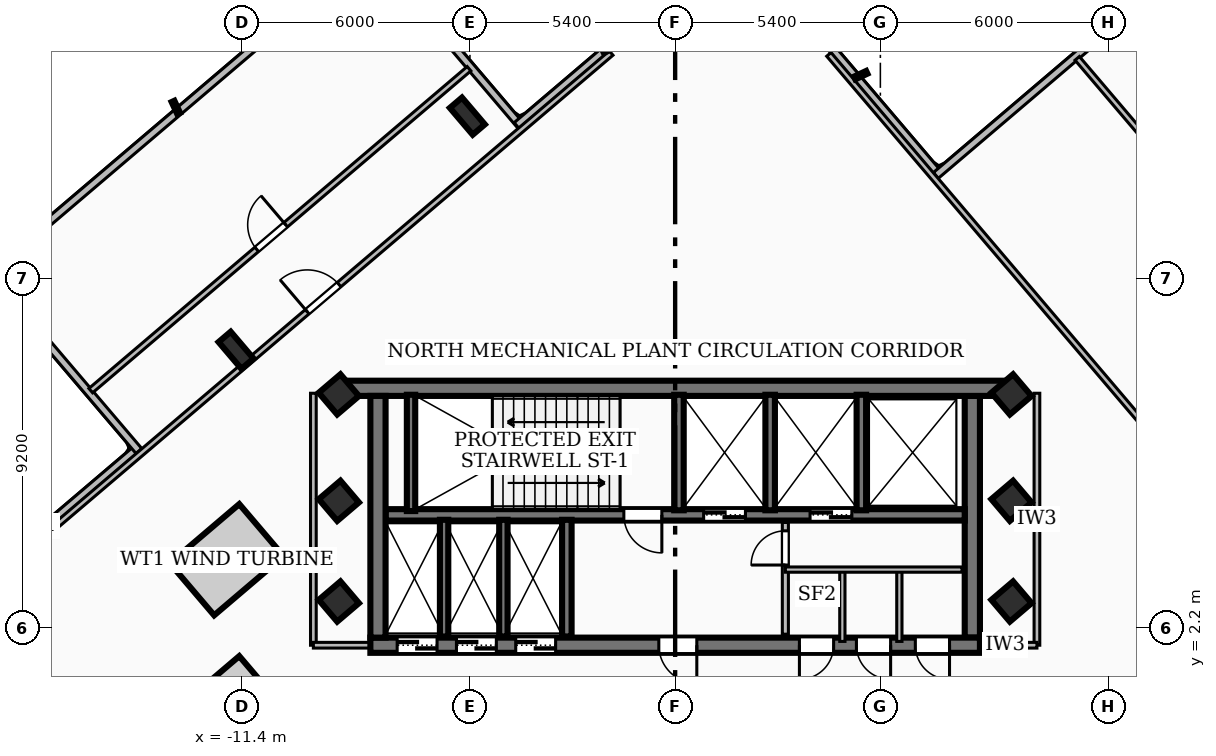
"""IFC4 building model, lengths in metres.
Left out: names, types, materials, properties, quantities, classifications, styles, units other than length and angle.
Written with IfcOpenShell. Run it as: python <this file> out.ifc"""

import sys

from ifc_helpers import new_model, si_unit, direction, frame, frame_2d, origin, origin_2d, place, context, subcontext, project, spatial, rectangle, hollow_rectangle, i_section, extrude, element, fill, save


model = new_model("IFC4")
c1 = context("Model", 3, precision=1e-05, world=origin(), true_north=direction((0.0, 1.0)))
c2 = subcontext(c1, "Body", "Model", "MODEL_VIEW")
j1 = project(units=[si_unit("LENGTHUNIT", "METRE"), si_unit("PLANEANGLEUNIT", "RADIAN")], contexts=[c1])
p1 = place(None, origin())
s1 = spatial("IfcSite", under=j1, at=p1, CompositionType="ELEMENT")
p2 = place(p1, origin())
s2 = spatial("IfcBuilding", under=s1, at=p2, CompositionType="ELEMENT")
p3 = place(p2, frame((0.0, 0.0, 239.4)))
s3 = spatial("IfcBuildingStorey", under=s2, at=p3, CompositionType="ELEMENT", Elevation=239.4)
p4 = place(p3, frame((-8.78, 8.51, 0.0), z_axis=(0.0, 0.0, 1.0), x_axis=(1.0, 0.0, 0.0)))
e1 = element("IfcWall", 1, at=p4, inside=s3, PredefinedType="SHEAR", context=c2, shape_type="SweptSolid", body=[
    extrude(rectangle(XDim=17.56, YDim=0.4, at=frame_2d((8.78, 0.0))), origin(), (0.0, 0.0, 1.0), 4.42),
])
p5 = place(p3, frame((8.02, 1.75, 0.0), z_axis=(0.0, 0.0, 1.0), x_axis=(-1.0, 0.0, 0.0)))
e2 = element("IfcWall", 2, at=p5, inside=s3, PredefinedType="SHEAR", context=c2, shape_type="SweptSolid", body=[
    extrude(rectangle(XDim=16.04, YDim=0.4, at=frame_2d((8.02, 0.0))), origin(), (0.0, 0.0, 1.0), 4.42),
])
p6 = place(p5, frame((7.45, 0.0, 0.0)))
e3 = element("IfcOpeningElement", 3, at=p6, cuts=e2, PredefinedType="OPENING", context=c2, shape_type="SweptSolid", body=[
    extrude(rectangle(XDim=1.0, YDim=2.1, at=frame_2d((0.5, 1.05))), frame((0.0, 0.21, 0.0), z_axis=(0.0, -1.0, 0.0), x_axis=(1.0, 0.0, 0.0)), (0.0, 0.0, 1.0), 0.42),
])
p7 = place(p5, frame((14.285, 0.0, 0.0)))
e4 = element("IfcOpeningElement", 4, at=p7, cuts=e2, PredefinedType="OPENING", context=c2, shape_type="SweptSolid", body=[
    extrude(rectangle(XDim=1.05, YDim=2.15, at=frame_2d((0.525, 1.075))), frame((0.0, 0.21, 0.0), z_axis=(0.0, -1.0, 0.0), x_axis=(1.0, 0.0, 0.0)), (0.0, 0.0, 1.0), 0.42),
])
p8 = place(p5, frame((12.725, 0.0, 0.0)))
e5 = element("IfcOpeningElement", 5, at=p8, cuts=e2, PredefinedType="OPENING", context=c2, shape_type="SweptSolid", body=[
    extrude(rectangle(XDim=1.05, YDim=2.15, at=frame_2d((0.525, 1.075))), frame((0.0, 0.21, 0.0), z_axis=(0.0, -1.0, 0.0), x_axis=(1.0, 0.0, 0.0)), (0.0, 0.0, 1.0), 0.42),
])
p9 = place(p5, frame((11.165, 0.0, 0.0)))
e6 = element("IfcOpeningElement", 6, at=p9, cuts=e2, PredefinedType="OPENING", context=c2, shape_type="SweptSolid", body=[
    extrude(rectangle(XDim=1.05, YDim=2.15, at=frame_2d((0.525, 1.075))), frame((0.0, 0.21, 0.0), z_axis=(0.0, -1.0, 0.0), x_axis=(1.0, 0.0, 0.0)), (0.0, 0.0, 1.0), 0.42),
])
p10 = place(p5, frame((3.85, 0.0, 0.0)))
e7 = element("IfcOpeningElement", 7, at=p10, cuts=e2, PredefinedType="OPENING", context=c2, shape_type="SweptSolid", body=[
    extrude(rectangle(XDim=0.9, YDim=2.06, at=frame_2d((0.45, 1.03))), frame((0.0, 0.21, 0.0), z_axis=(0.0, -1.0, 0.0), x_axis=(1.0, 0.0, 0.0)), (0.0, 0.0, 1.0), 0.42),
])
p11 = place(p5, frame((2.35, 0.0, 0.0)))
e8 = element("IfcOpeningElement", 8, at=p11, cuts=e2, PredefinedType="OPENING", context=c2, shape_type="SweptSolid", body=[
    extrude(rectangle(XDim=0.9, YDim=2.06, at=frame_2d((0.45, 1.03))), frame((0.0, 0.21, 0.0), z_axis=(0.0, -1.0, 0.0), x_axis=(1.0, 0.0, 0.0)), (0.0, 0.0, 1.0), 0.42),
])
p12 = place(p5, frame((0.8, 0.0, 0.0)))
e9 = element("IfcOpeningElement", 9, at=p12, cuts=e2, PredefinedType="OPENING", context=c2, shape_type="SweptSolid", body=[
    extrude(rectangle(XDim=0.9, YDim=2.06, at=frame_2d((0.45, 1.03))), frame((0.0, 0.21, 0.0), z_axis=(0.0, -1.0, 0.0), x_axis=(1.0, 0.0, 0.0)), (0.0, 0.0, 1.0), 0.42),
])
for number, where, z_axis, x_axis in (
    (10, (-7.82, 1.95, 0.0), (0.0, 0.0, 1.0), (0.0, 1.0, 0.0)),
    (11, (7.82, 8.31, 0.0), (0.0, 0.0, 1.0), (0.0, -1.0, 0.0)),
):
    element("IfcWall", number, at=place(p3, frame(where, z_axis=z_axis, x_axis=x_axis)), inside=s3, PredefinedType="SHEAR", context=c2, shape_type="SweptSolid", body=[
        extrude(rectangle(XDim=6.36, YDim=0.4, at=frame_2d((3.18, 0.0))), origin(), (0.0, 0.0, 1.0), 4.42),
    ])
p13 = place(p3, frame((7.62, 5.18, 0.0), z_axis=(0.0, 0.0, 1.0), x_axis=(-1.0, 0.0, 0.0)))
e12 = element("IfcWall", 12, at=p13, inside=s3, PredefinedType="SOLIDWALL", context=c2, shape_type="SweptSolid", body=[
    extrude(rectangle(XDim=15.24, YDim=0.3, at=frame_2d((7.62, 0.0))), origin(), (0.0, 0.0, 1.0), 4.42),
])
p14 = place(p13, frame((5.77, 0.0, 0.0)))
e13 = element("IfcOpeningElement", 13, at=p14, cuts=e12, PredefinedType="OPENING", context=c2, shape_type="SweptSolid", body=[
    extrude(rectangle(XDim=1.1, YDim=2.15, at=frame_2d((0.55, 1.075))), frame((0.0, 0.16, 0.0), z_axis=(0.0, -1.0, 0.0), x_axis=(1.0, 0.0, 0.0)), (0.0, 0.0, 1.0), 0.32),
])
p15 = place(p13, frame((2.97, 0.0, 0.0)))
e14 = element("IfcOpeningElement", 14, at=p15, cuts=e12, PredefinedType="OPENING", context=c2, shape_type="SweptSolid", body=[
    extrude(rectangle(XDim=1.1, YDim=2.15, at=frame_2d((0.55, 1.075))), frame((0.0, 0.16, 0.0), z_axis=(0.0, -1.0, 0.0), x_axis=(1.0, 0.0, 0.0)), (0.0, 0.0, 1.0), 0.32),
])
p16 = place(p13, frame((7.97, 0.0, 0.0)))
e15 = element("IfcOpeningElement", 15, at=p16, cuts=e12, PredefinedType="OPENING", context=c2, shape_type="SweptSolid", body=[
    extrude(rectangle(XDim=1.0, YDim=2.1, at=frame_2d((0.5, 1.05))), frame((0.0, 0.16, 0.0), z_axis=(0.0, -1.0, 0.0), x_axis=(1.0, 0.0, 0.0)), (0.0, 0.0, 1.0), 0.32),
])
p17 = place(p3, frame((-6.95, 5.28, 0.0), z_axis=(0.0, 0.0, 1.0), x_axis=(0.0, 1.0, 0.0)))
e16 = element("IfcWall", 16, at=p17, inside=s3, PredefinedType="SOLIDWALL", context=c2, shape_type="SweptSolid", body=[
    extrude(rectangle(XDim=3.06, YDim=0.22, at=frame_2d((1.53, 0.0))), origin(), (0.0, 0.0, 1.0), 4.42),
])
for number, where, z_axis, x_axis in (
    (17, (0.1, 5.3, 0.0), (0.0, 0.0, 1.0), (0.0, 1.0, 0.0)),
    (18, (2.5, 5.3, 0.0), (0.0, 0.0, 1.0), (0.0, 1.0, 0.0)),
    (19, (4.9, 5.3, 0.0), (0.0, 0.0, 1.0), (0.0, 1.0, 0.0)),
):
    element("IfcWall", number, at=place(p3, frame(where, z_axis=z_axis, x_axis=x_axis)), inside=s3, PredefinedType="SOLIDWALL", context=c2, shape_type="SweptSolid", body=[
        extrude(rectangle(XDim=3.04, YDim=0.25, at=frame_2d((1.52, 0.0))), origin(), (0.0, 0.0, 1.0), 4.42),
    ])
p18 = place(p3, frame((-2.85, 1.98, 0.0), z_axis=(0.0, 0.0, 1.0), x_axis=(0.0, 1.0, 0.0)))
e20 = element("IfcWall", 20, at=p18, inside=s3, PredefinedType="SOLIDWALL", context=c2, shape_type="SweptSolid", body=[
    extrude(rectangle(XDim=3.07, YDim=0.25, at=frame_2d((1.535, 0.0))), origin(), (0.0, 0.0, 1.0), 4.42),
])
for number, where, z_axis, x_axis in (
    (21, (-6.08, 1.98, 0.0), (0.0, 0.0, 1.0), (0.0, 1.0, 0.0)),
    (22, (-4.52, 1.98, 0.0), (0.0, 0.0, 1.0), (0.0, 1.0, 0.0)),
):
    element("IfcWall", number, at=place(p3, frame(where, z_axis=z_axis, x_axis=x_axis)), inside=s3, PredefinedType="SOLIDWALL", context=c2, shape_type="SweptSolid", body=[
        extrude(rectangle(XDim=3.07, YDim=0.22, at=frame_2d((1.535, 0.0))), origin(), (0.0, 0.0, 1.0), 4.42),
    ])
for number, where, z_axis, x_axis in (
    (23, (-8.85, 2.9, 0.0), (0.0, 0.0, 1.0), (0.762, 0.648, 0.0)),
    (24, (-8.85, 5.55, 0.0), (0.0, 0.0, 1.0), (0.762, 0.648, 0.0)),
    (25, (8.85, 2.9, 0.0), (0.0, 0.0, 1.0), (0.762, 0.648, 0.0)),
    (26, (8.85, 5.55, 0.0), (0.0, 0.0, 1.0), (0.762, 0.648, 0.0)),
    (27, (-8.85, 8.35, 0.0), (0.0, 0.0, 1.0), (0.762, 0.648, 0.0)),
    (28, (8.85, 8.35, 0.0), (0.0, 0.0, 1.0), (0.762, 0.648, 0.0)),
):
    element("IfcColumn", number, at=place(p3, frame(where, z_axis=z_axis, x_axis=x_axis)), inside=s3, PredefinedType="COLUMN", context=c2, shape_type="SweptSolid", body=[
        extrude(rectangle(XDim=0.75, YDim=0.75, at=origin_2d()), origin(), (0.0, 0.0, 1.0), 4.68),
    ])
for number, where, z_axis, x_axis in (
    (29, (-5.468, 15.671, 0.0), (0.0, 0.0, 1.0), (0.762, 0.648, 0.0)),
    (30, (-11.554, 9.51, 0.0), (0.0, 0.0, 1.0), (0.762, 0.648, 0.0)),
):
    element("IfcColumn", number, at=place(p3, frame(where, z_axis=z_axis, x_axis=x_axis)), inside=s3, PredefinedType="COLUMN", context=c2, shape_type="SweptSolid", body=[
        extrude(i_section(OverallWidth=0.418, OverallDepth=0.927, WebThickness=0.019, FlangeThickness=0.032, at=origin_2d()), origin(), (0.0, 0.0, 1.0), 4.68),
    ])
p19 = place(p3, frame((-11.8, 4.0, 0.0), z_axis=(0.0, 0.0, 1.0), x_axis=(0.761538307537, 0.648119901063, 0.0)))
e31 = element("IfcColumn", 31, at=p19, inside=s3, PredefinedType="COLUMN", context=c2, shape_type="SweptSolid", body=[
    extrude(hollow_rectangle(XDim=0.3, YDim=0.3, WallThickness=0.016, at=origin_2d()), origin(), (0.0, 0.0, 1.0), 1.6),
])
p20 = place(p3, frame((-19.236, 2.604, 0.0), z_axis=(0.0, 0.0, 1.0), x_axis=(0.761575518431, 0.648076175867, 0.0)))
e32 = element("IfcWall", 32, at=p20, inside=s3, PredefinedType="SOLIDWALL", context=c2, shape_type="SweptSolid", body=[
    extrude(rectangle(XDim=6.741, YDim=0.2, at=frame_2d((3.371, 0.0))), origin(), (0.0, 0.0, 1.0), 4.42),
])
p21 = place(p3, frame((-14.111, 6.86, 0.0), z_axis=(0.0, 0.0, 1.0), x_axis=(-0.648040740079, 0.761605671721, 0.0)))
e33 = element("IfcWall", 33, at=p21, inside=s3, PredefinedType="SOLIDWALL", context=c2, shape_type="SweptSolid", body=[
    extrude(rectangle(XDim=4.641, YDim=0.2, at=frame_2d((2.321, 0.0))), origin(), (0.0, 0.0, 1.0), 4.42),
])
p22 = place(p3, frame((-16.951, 12.493, 0.0), z_axis=(0.0, 0.0, 1.0), x_axis=(0.761554435907, 0.648100949814, 0.0)))
e34 = element("IfcWall", 34, at=p22, inside=s3, PredefinedType="SOLIDWALL", context=c2, shape_type="SweptSolid", body=[
    extrude(rectangle(XDim=10.224, YDim=0.2, at=frame_2d((5.112, 0.0))), origin(), (0.0, 0.0, 1.0), 4.42),
])
p23 = place(p3, frame((-7.067, 18.95, 0.0), z_axis=(0.0, 0.0, 1.0), x_axis=(0.648040740079, -0.761605671721, 0.0)))
e35 = element("IfcWall", 35, at=p23, inside=s3, PredefinedType="SOLIDWALL", context=c2, shape_type="SweptSolid", body=[
    extrude(rectangle(XDim=4.641, YDim=0.2, at=frame_2d((2.321, 0.0))), origin(), (0.0, 0.0, 1.0), 2.212),
])
p24 = place(p3, frame((-4.172, 15.424, 0.0), z_axis=(0.0, 0.0, 1.0), x_axis=(0.761580290689, 0.648070567789, 0.0)))
e36 = element("IfcWall", 36, at=p24, inside=s3, PredefinedType="SOLIDWALL", context=c2, shape_type="SweptSolid", body=[
    extrude(rectangle(XDim=6.143, YDim=0.2, at=frame_2d((3.071, 0.0))), origin(), (0.0, 0.0, 1.0), 2.212),
])
p25 = place(p3, frame((2.604, 19.236, 0.0), z_axis=(0.0, 0.0, 1.0), x_axis=(0.648076175867, -0.761575518431, 0.0)))
e37 = element("IfcWall", 37, at=p25, inside=s3, PredefinedType="SOLIDWALL", context=c2, shape_type="SweptSolid", body=[
    extrude(rectangle(XDim=6.741, YDim=0.2, at=frame_2d((3.371, 0.0))), origin(), (0.0, 0.0, 1.0), 2.212),
])
p26 = place(p3, frame((6.86, 14.111, 0.0), z_axis=(0.0, 0.0, 1.0), x_axis=(0.761539969586, 0.648117948157, 0.0)))
e38 = element("IfcWall", 38, at=p26, inside=s3, PredefinedType="SOLIDWALL", context=c2, shape_type="SweptSolid", body=[
    extrude(rectangle(XDim=8.843, YDim=0.2, at=frame_2d((4.421, 0.0))), origin(), (0.0, 0.0, 1.0), 2.212),
])
p27 = place(p3, frame((2.9, 2.04, 0.0), z_axis=(0.0, 0.0, 1.0), x_axis=(0.0, 1.0, 0.0)))
e39 = element("IfcWall", 39, at=p27, inside=s3, PredefinedType="PARTITIONING", context=c2, shape_type="SweptSolid", body=[
    extrude(rectangle(XDim=2.94, YDim=0.16, at=frame_2d((1.47, 0.0))), origin(), (0.0, 0.0, 1.0), 3.65),
])
p28 = place(p27, frame((1.82, 0.0, 0.0)))
e40 = element("IfcOpeningElement", 40, at=p28, cuts=e39, PredefinedType="OPENING", context=c2, shape_type="SweptSolid", body=[
    extrude(rectangle(XDim=0.9, YDim=2.06, at=frame_2d((0.45, 1.03))), frame((0.0, 0.09, 0.0), z_axis=(0.0, -1.0, 0.0), x_axis=(1.0, 0.0, 0.0)), (0.0, 0.0, 1.0), 0.18),
])
p29 = place(p3, frame((2.9, 3.74, 0.0), z_axis=(0.0, 0.0, 1.0), x_axis=(1.0, 0.0, 0.0)))
e41 = element("IfcWall", 41, at=p29, inside=s3, PredefinedType="PARTITIONING", context=c2, shape_type="SweptSolid", body=[
    extrude(rectangle(XDim=4.65, YDim=0.138, at=frame_2d((2.325, 0.0))), origin(), (0.0, 0.0, 1.0), 4.42),
])
for number, where, z_axis, x_axis in (
    (42, (4.4, 1.85, 0.0), (0.0, 0.0, 1.0), (0.0, 1.0, 0.0)),
    (43, (5.9, 1.85, 0.0), (0.0, 0.0, 1.0), (0.0, 1.0, 0.0)),
):
    element("IfcWall", number, at=place(p3, frame(where, z_axis=z_axis, x_axis=x_axis)), inside=s3, PredefinedType="PARTITIONING", context=c2, shape_type="SweptSolid", body=[
        extrude(rectangle(XDim=1.89, YDim=0.138, at=frame_2d((0.945, 0.0))), origin(), (0.0, 0.0, 1.0), 3.65),
    ])
p30 = place(p3, frame((-9.52, 1.75, 0.0), z_axis=(0.0, 0.0, 1.0), x_axis=(0.0, 1.0, 0.0)))
e44 = element("IfcWall", 44, at=p30, inside=s3, PredefinedType="PARTITIONING", context=c2, shape_type="SweptSolid", body=[
    extrude(rectangle(XDim=6.63, YDim=0.15, at=frame_2d((3.315, 0.0))), origin(), (0.0, 0.0, 1.0), 2.212),
])
p31 = place(p3, frame((-7.85, 1.75, 0.0), z_axis=(0.0, 0.0, 1.0), x_axis=(-1.0, 0.0, 0.0)))
e45 = element("IfcWall", 45, at=p31, inside=s3, PredefinedType="PARTITIONING", context=c2, shape_type="SweptSolid", body=[
    extrude(rectangle(XDim=1.67, YDim=0.15, at=frame_2d((0.835, 0.0))), origin(), (0.0, 0.0, 1.0), 3.65),
])
p32 = place(p3, frame((9.52, 1.75, 0.0), z_axis=(0.0, 0.0, 1.0), x_axis=(0.0, 1.0, 0.0)))
e46 = element("IfcWall", 46, at=p32, inside=s3, PredefinedType="PARTITIONING", context=c2, shape_type="SweptSolid", body=[
    extrude(rectangle(XDim=6.63, YDim=0.15, at=frame_2d((3.315, 0.0))), origin(), (0.0, 0.0, 1.0), 2.212),
])
p33 = place(p3, frame((7.85, 1.75, 0.0), z_axis=(0.0, 0.0, 1.0), x_axis=(1.0, 0.0, 0.0)))
e47 = element("IfcWall", 47, at=p33, inside=s3, PredefinedType="PARTITIONING", context=c2, shape_type="SweptSolid", body=[
    extrude(rectangle(XDim=1.67, YDim=0.15, at=frame_2d((0.835, 0.0))), origin(), (0.0, 0.0, 1.0), 3.65),
])
p34 = place(p3, frame((4.045, 17.296, 0.0), z_axis=(0.0, 0.0, 1.0), x_axis=(0.648103934292, -0.761551896035, 0.0)))
e48 = element("IfcWall", 48, at=p34, inside=s3, PredefinedType="PARTITIONING", context=c2, shape_type="SweptSolid", body=[
    extrude(rectangle(XDim=20.5, YDim=0.15, at=frame_2d((10.25, 0.0))), origin(), (0.0, 0.0, 1.0), 2.212),
])
p35 = place(p34, frame((13.799, 0.0, 0.0)))
e49 = element("IfcOpeningElement", 49, at=p35, cuts=e48, PredefinedType="OPENING", context=c2, shape_type="SweptSolid", body=[
    extrude(rectangle(XDim=1.1, YDim=2.15, at=frame_2d((0.55, 1.075))), frame((0.0, 0.085, 0.0), z_axis=(0.0, -1.0, 0.0), x_axis=(1.0, 0.0, 0.0)), (0.0, 0.0, 1.0), 0.17),
])
p36 = place(p3, frame((10.58, 17.192, 0.0), z_axis=(0.0, 0.0, 1.0), x_axis=(0.648136838455, -0.761523892362, 0.0)))
e50 = element("IfcWall", 50, at=p36, inside=s3, PredefinedType="PARTITIONING", context=c2, shape_type="SweptSolid", body=[
    extrude(rectangle(XDim=13.07, YDim=0.15, at=frame_2d((6.535, 0.0))), origin(), (0.0, 0.0, 1.0), 2.212),
])
p37 = place(p36, frame((5.735, 0.0, 0.0)))
e51 = element("IfcOpeningElement", 51, at=p37, cuts=e50, PredefinedType="OPENING", context=c2, shape_type="SweptSolid", body=[
    extrude(rectangle(XDim=1.0, YDim=2.1, at=frame_2d((0.5, 1.05))), frame((0.0, 0.085, 0.0), z_axis=(0.0, -1.0, 0.0), x_axis=(1.0, 0.0, 0.0)), (0.0, 0.0, 1.0), 0.17),
])
p38 = place(p3, frame((-17.296, 4.045, 0.0), z_axis=(0.0, 0.0, 1.0), x_axis=(0.761551896035, 0.648103934292, 0.0)))
e52 = element("IfcWall", 52, at=p38, inside=s3, PredefinedType="PARTITIONING", context=c2, shape_type="SweptSolid", body=[
    extrude(rectangle(XDim=20.5, YDim=0.15, at=frame_2d((10.25, 0.0))), origin(), (0.0, 0.0, 1.0), 2.212),
])
p39 = place(p38, frame((9.999, 0.0, 0.0)))
e53 = element("IfcOpeningElement", 53, at=p39, cuts=e52, PredefinedType="OPENING", context=c2, shape_type="SweptSolid", body=[
    extrude(rectangle(XDim=1.1, YDim=2.15, at=frame_2d((0.55, 1.075))), frame((0.0, 0.085, 0.0), z_axis=(0.0, -1.0, 0.0), x_axis=(1.0, 0.0, 0.0)), (0.0, 0.0, 1.0), 0.17),
])
p40 = place(p3, frame((-15.378, 8.449, 0.0), z_axis=(0.0, 0.0, 1.0), x_axis=(0.761592155386, 0.648056624729, 0.0)))
e54 = element("IfcWall", 54, at=p40, inside=s3, PredefinedType="PARTITIONING", context=c2, shape_type="SweptSolid", body=[
    extrude(rectangle(XDim=13.07, YDim=0.15, at=frame_2d((6.535, 0.0))), origin(), (0.0, 0.0, 1.0), 2.212),
])
p41 = place(p40, frame((5.735, 0.0, 0.0)))
e55 = element("IfcOpeningElement", 55, at=p41, cuts=e54, PredefinedType="OPENING", context=c2, shape_type="SweptSolid", body=[
    extrude(rectangle(XDim=1.0, YDim=2.1, at=frame_2d((0.5, 1.05))), frame((0.0, 0.085, 0.0), z_axis=(0.0, -1.0, 0.0), x_axis=(1.0, 0.0, 0.0)), (0.0, 0.0, 1.0), 0.17),
])
p42 = place(p6, origin())
e56 = element("IfcDoor", 56, at=p42, inside=s3, OperationType="SINGLE_SWING_LEFT", PredefinedType="DOOR", context=c2, shape_type="SweptSolid", body=[
    extrude(rectangle(XDim=1.0, YDim=2.1, at=frame_2d((0.5, 1.05))), frame((0.0, 0.025, 0.0), z_axis=(0.0, -1.0, 0.0), x_axis=(1.0, 0.0, 0.0)), (0.0, 0.0, 1.0), 0.05),
])
fill(e3, e56)
p43 = place(p14, origin())
e57 = element("IfcDoor", 57, at=p43, inside=s3, OperationType="DOUBLE_DOOR_SLIDING", PredefinedType="DOOR", context=c2, shape_type="SweptSolid", body=[
    extrude(rectangle(XDim=1.1, YDim=2.15, at=frame_2d((0.55, 1.075))), frame((0.0, 0.025, 0.0), z_axis=(0.0, -1.0, 0.0), x_axis=(1.0, 0.0, 0.0)), (0.0, 0.0, 1.0), 0.05),
])
fill(e13, e57)
p44 = place(p15, origin())
e58 = element("IfcDoor", 58, at=p44, inside=s3, OperationType="DOUBLE_DOOR_SLIDING", PredefinedType="DOOR", context=c2, shape_type="SweptSolid", body=[
    extrude(rectangle(XDim=1.1, YDim=2.15, at=frame_2d((0.55, 1.075))), frame((0.0, 0.025, 0.0), z_axis=(0.0, -1.0, 0.0), x_axis=(1.0, 0.0, 0.0)), (0.0, 0.0, 1.0), 0.05),
])
fill(e14, e58)
p45 = place(p16, origin())
e59 = element("IfcDoor", 59, at=p45, inside=s3, OperationType="SINGLE_SWING_LEFT", PredefinedType="DOOR", context=c2, shape_type="SweptSolid", body=[
    extrude(rectangle(XDim=1.0, YDim=2.1, at=frame_2d((0.5, 1.05))), frame((0.0, 0.025, 0.0), z_axis=(0.0, -1.0, 0.0), x_axis=(1.0, 0.0, 0.0)), (0.0, 0.0, 1.0), 0.05),
])
fill(e15, e59)
p46 = place(p7, origin())
e60 = element("IfcDoor", 60, at=p46, inside=s3, OperationType="DOUBLE_DOOR_SLIDING", PredefinedType="DOOR", context=c2, shape_type="SweptSolid", body=[
    extrude(rectangle(XDim=1.05, YDim=2.15, at=frame_2d((0.525, 1.075))), frame((0.0, 0.025, 0.0), z_axis=(0.0, -1.0, 0.0), x_axis=(1.0, 0.0, 0.0)), (0.0, 0.0, 1.0), 0.05),
])
fill(e4, e60)
p47 = place(p8, origin())
e61 = element("IfcDoor", 61, at=p47, inside=s3, OperationType="DOUBLE_DOOR_SLIDING", PredefinedType="DOOR", context=c2, shape_type="SweptSolid", body=[
    extrude(rectangle(XDim=1.05, YDim=2.15, at=frame_2d((0.525, 1.075))), frame((0.0, 0.025, 0.0), z_axis=(0.0, -1.0, 0.0), x_axis=(1.0, 0.0, 0.0)), (0.0, 0.0, 1.0), 0.05),
])
fill(e5, e61)
p48 = place(p9, origin())
e62 = element("IfcDoor", 62, at=p48, inside=s3, OperationType="DOUBLE_DOOR_SLIDING", PredefinedType="DOOR", context=c2, shape_type="SweptSolid", body=[
    extrude(rectangle(XDim=1.05, YDim=2.15, at=frame_2d((0.525, 1.075))), frame((0.0, 0.025, 0.0), z_axis=(0.0, -1.0, 0.0), x_axis=(1.0, 0.0, 0.0)), (0.0, 0.0, 1.0), 0.05),
])
fill(e6, e62)
p49 = place(p10, origin())
e63 = element("IfcDoor", 63, at=p49, inside=s3, OperationType="SINGLE_SWING_RIGHT", PredefinedType="DOOR", context=c2, shape_type="SweptSolid", body=[
    extrude(rectangle(XDim=0.9, YDim=2.06, at=frame_2d((0.45, 1.03))), frame((0.0, 0.025, 0.0), z_axis=(0.0, -1.0, 0.0), x_axis=(1.0, 0.0, 0.0)), (0.0, 0.0, 1.0), 0.05),
])
fill(e7, e63)
p50 = place(p11, origin())
e64 = element("IfcDoor", 64, at=p50, inside=s3, OperationType="SINGLE_SWING_LEFT", PredefinedType="DOOR", context=c2, shape_type="SweptSolid", body=[
    extrude(rectangle(XDim=0.9, YDim=2.06, at=frame_2d((0.45, 1.03))), frame((0.0, 0.025, 0.0), z_axis=(0.0, -1.0, 0.0), x_axis=(1.0, 0.0, 0.0)), (0.0, 0.0, 1.0), 0.05),
])
fill(e8, e64)
p51 = place(p12, origin())
e65 = element("IfcDoor", 65, at=p51, inside=s3, OperationType="SINGLE_SWING_LEFT", PredefinedType="DOOR", context=c2, shape_type="SweptSolid", body=[
    extrude(rectangle(XDim=0.9, YDim=2.06, at=frame_2d((0.45, 1.03))), frame((0.0, 0.025, 0.0), z_axis=(0.0, -1.0, 0.0), x_axis=(1.0, 0.0, 0.0)), (0.0, 0.0, 1.0), 0.05),
])
fill(e9, e65)
p52 = place(p28, origin())
e66 = element("IfcDoor", 66, at=p52, inside=s3, OperationType="SINGLE_SWING_LEFT", PredefinedType="DOOR", context=c2, shape_type="SweptSolid", body=[
    extrude(rectangle(XDim=0.9, YDim=2.06, at=frame_2d((0.45, 1.03))), frame((0.0, 0.025, 0.0), z_axis=(0.0, -1.0, 0.0), x_axis=(1.0, 0.0, 0.0)), (0.0, 0.0, 1.0), 0.05),
])
fill(e40, e66)
p53 = place(p39, origin())
e67 = element("IfcDoor", 67, at=p53, inside=s3, OperationType="SINGLE_SWING_LEFT", PredefinedType="DOOR", context=c2, shape_type="SweptSolid", body=[
    extrude(rectangle(XDim=1.1, YDim=2.15, at=frame_2d((0.55, 1.075))), frame((0.0, 0.025, 0.0), z_axis=(0.0, -1.0, 0.0), x_axis=(1.0, 0.0, 0.0)), (0.0, 0.0, 1.0), 0.05),
])
fill(e53, e67)
p54 = place(p41, origin())
e68 = element("IfcDoor", 68, at=p54, inside=s3, OperationType="SINGLE_SWING_RIGHT", PredefinedType="DOOR", context=c2, shape_type="SweptSolid", body=[
    extrude(rectangle(XDim=1.0, YDim=2.1, at=frame_2d((0.5, 1.05))), frame((0.0, 0.025, 0.0), z_axis=(0.0, -1.0, 0.0), x_axis=(1.0, 0.0, 0.0)), (0.0, 0.0, 1.0), 0.05),
])
fill(e55, e68)
save(model, sys.argv[1])
